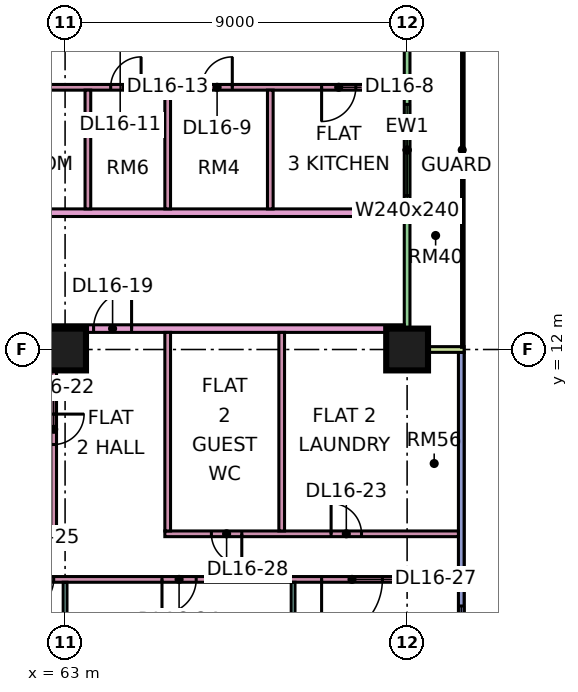
"""IFC4 building model, lengths in metres.
Left out: names, types, materials, properties, quantities, classifications, styles, units other than length and angle.
Written with IfcOpenShell. Run it as: python <this file> out.ifc"""

import sys

from ifc_helpers import new_model, si_unit, direction, frame, frame_2d, origin, origin_2d, place, context, subcontext, project, spatial, rectangle, extrude, element, fill, save


model = new_model("IFC4")
c1 = context("Model", 3, precision=1e-05, world=origin(), true_north=direction((0.0, 1.0)))
c2 = subcontext(c1, "Body", "Model", "MODEL_VIEW")
j1 = project(units=[si_unit("LENGTHUNIT", "METRE"), si_unit("PLANEANGLEUNIT", "RADIAN")], contexts=[c1])
p1 = place(None, origin())
s1 = spatial("IfcSite", under=j1, at=p1, CompositionType="ELEMENT")
p2 = place(p1, origin())
s2 = spatial("IfcBuilding", under=s1, at=p2, CompositionType="ELEMENT")
p3 = place(p2, frame((0.0, 0.0, 75.15)))
s3 = spatial("IfcBuildingStorey", under=s2, at=p3, CompositionType="ELEMENT", Elevation=75.15)
for number, where, z_axis, x_axis in (
    (1, (63.0, 12.0, 0.0), (0.0, 0.0, 1.0), (1.0, 0.0, 0.0)),
    (2, (72.0, 12.0, 0.0), (0.0, 0.0, 1.0), (1.0, 0.0, 0.0)),
):
    element("IfcColumn", number, at=place(p3, frame(where, z_axis=z_axis, x_axis=x_axis)), inside=s3, PredefinedType="COLUMN", context=c2, shape_type="SweptSolid", body=[
        extrude(rectangle(XDim=1.1, YDim=1.1, at=origin_2d()), origin(), (0.0, 0.0, 1.0), 3.75),
    ])
p4 = place(p3, frame((73.425, 1.5, 0.0), z_axis=(0.0, 0.0, 1.0), x_axis=(0.0, 1.0, 0.0)))
e3 = element("IfcWall", 3, at=p4, inside=s3, PredefinedType="SOLIDWALL", context=c2, shape_type="SweptSolid", body=[
    extrude(rectangle(XDim=10.425, YDim=0.15, at=frame_2d((5.212, 0.0))), origin(), (0.0, 0.0, 1.0), 3.35),
])
p5 = place(p4, frame((0.75, 0.0, 0.45)))
e4 = element("IfcOpeningElement", 4, at=p5, cuts=e3, PredefinedType="OPENING", context=c2, shape_type="SweptSolid", body=[
    extrude(rectangle(XDim=3.0, YDim=2.4, at=frame_2d((1.5, 1.2))), frame((0.0, 0.085, 0.0), z_axis=(0.0, -1.0, 0.0), x_axis=(1.0, 0.0, 0.0)), (0.0, 0.0, 1.0), 0.17),
])
p6 = place(p3, frame((72.0, 12.075, 0.0), z_axis=(0.0, 0.0, 1.0), x_axis=(0.0, 1.0, 0.0)))
e5 = element("IfcWall", 5, at=p6, inside=s3, PredefinedType="SOLIDWALL", context=c2, shape_type="SweptSolid", body=[
    extrude(rectangle(XDim=10.35, YDim=0.15, at=frame_2d((5.175, 0.0))), origin(), (0.0, 0.0, 1.0), 3.35),
])
p7 = place(p6, frame((3.975, 0.0, 0.45)))
e6 = element("IfcOpeningElement", 6, at=p7, cuts=e5, PredefinedType="OPENING", context=c2, shape_type="SweptSolid", body=[
    extrude(rectangle(XDim=2.4, YDim=2.4, at=frame_2d((1.2, 1.2))), frame((0.0, 0.085, 0.0), z_axis=(0.0, -1.0, 0.0), x_axis=(1.0, 0.0, 0.0)), (0.0, 0.0, 1.0), 0.17),
])
p8 = place(p6, frame((8.587, 0.0, 0.45)))
e7 = element("IfcOpeningElement", 7, at=p8, cuts=e5, PredefinedType="OPENING", context=c2, shape_type="SweptSolid", body=[
    extrude(rectangle(XDim=1.2, YDim=2.4, at=frame_2d((0.6, 1.2))), frame((0.0, 0.085, 0.0), z_axis=(0.0, -1.0, 0.0), x_axis=(1.0, 0.0, 0.0)), (0.0, 0.0, 1.0), 0.17),
])
p9 = place(p3, frame((73.5, 12.0, 0.0), z_axis=(0.0, 0.0, 1.0), x_axis=(-1.0, 0.0, 0.0)))
e8 = element("IfcWall", 8, at=p9, inside=s3, PredefinedType="SOLIDWALL", context=c2, shape_type="SweptSolid", body=[
    extrude(rectangle(XDim=1.5, YDim=0.15, at=frame_2d((0.75, 0.0))), origin(), (0.0, 0.0, 1.0), 3.35),
])
p10 = place(p3, frame((40.65, 12.55, 0.0), z_axis=(0.0, 0.0, 1.0), x_axis=(1.0, 0.0, 0.0)))
e9 = element("IfcWall", 9, at=p10, inside=s3, PredefinedType="PARTITIONING", context=c2, shape_type="SweptSolid", body=[
    extrude(rectangle(XDim=31.276, YDim=0.2, at=frame_2d((15.638, 0.0))), origin(), (0.0, 0.0, 1.0), 3.35),
])
p11 = place(p10, frame((23.1, 0.0, 0.0)))
e10 = element("IfcOpeningElement", 10, at=p11, cuts=e9, PredefinedType="OPENING", context=c2, shape_type="SweptSolid", body=[
    extrude(rectangle(XDim=1.0, YDim=2.1, at=frame_2d((0.5, 1.05))), frame((0.0, 0.11, 0.0), z_axis=(0.0, -1.0, 0.0), x_axis=(1.0, 0.0, 0.0)), (0.0, 0.0, 1.0), 0.22),
])
p12 = place(p10, frame((1.05, 0.0, 0.0)))
e11 = element("IfcOpeningElement", 11, at=p12, cuts=e9, PredefinedType="OPENING", context=c2, shape_type="SweptSolid", body=[
    extrude(rectangle(XDim=1.0, YDim=2.1, at=frame_2d((0.5, 1.05))), frame((0.0, 0.11, 0.0), z_axis=(0.0, -1.0, 0.0), x_axis=(1.0, 0.0, 0.0)), (0.0, 0.0, 1.0), 0.22),
])
p13 = place(p3, frame((48.1, 5.95, 0.0), z_axis=(0.0, 0.0, 1.0), x_axis=(1.0, 0.0, 0.0)))
e12 = element("IfcWall", 12, at=p13, inside=s3, PredefinedType="PARTITIONING", context=c2, shape_type="SweptSolid", body=[
    extrude(rectangle(XDim=25.25, YDim=0.15, at=frame_2d((12.625, 0.0))), origin(), (0.0, 0.0, 1.0), 3.35),
])
p14 = place(p13, frame((0.95, 0.0, 0.0)))
e13 = element("IfcOpeningElement", 13, at=p14, cuts=e12, PredefinedType="OPENING", context=c2, shape_type="SweptSolid", body=[
    extrude(rectangle(XDim=0.9, YDim=2.1, at=frame_2d((0.45, 1.05))), frame((0.0, 0.085, 0.0), z_axis=(0.0, -1.0, 0.0), x_axis=(1.0, 0.0, 0.0)), (0.0, 0.0, 1.0), 0.17),
])
p15 = place(p13, frame((3.95, 0.0, 0.0)))
e14 = element("IfcOpeningElement", 14, at=p15, cuts=e12, PredefinedType="OPENING", context=c2, shape_type="SweptSolid", body=[
    extrude(rectangle(XDim=0.9, YDim=2.1, at=frame_2d((0.45, 1.05))), frame((0.0, 0.085, 0.0), z_axis=(0.0, -1.0, 0.0), x_axis=(1.0, 0.0, 0.0)), (0.0, 0.0, 1.0), 0.17),
])
p16 = place(p13, frame((6.95, 0.0, 0.0)))
e15 = element("IfcOpeningElement", 15, at=p16, cuts=e12, PredefinedType="OPENING", context=c2, shape_type="SweptSolid", body=[
    extrude(rectangle(XDim=0.9, YDim=2.1, at=frame_2d((0.45, 1.05))), frame((0.0, 0.085, 0.0), z_axis=(0.0, -1.0, 0.0), x_axis=(1.0, 0.0, 0.0)), (0.0, 0.0, 1.0), 0.17),
])
p17 = place(p13, frame((9.95, 0.0, 0.0)))
e16 = element("IfcOpeningElement", 16, at=p17, cuts=e12, PredefinedType="OPENING", context=c2, shape_type="SweptSolid", body=[
    extrude(rectangle(XDim=0.9, YDim=2.1, at=frame_2d((0.45, 1.05))), frame((0.0, 0.085, 0.0), z_axis=(0.0, -1.0, 0.0), x_axis=(1.0, 0.0, 0.0)), (0.0, 0.0, 1.0), 0.17),
])
p18 = place(p13, frame((17.45, 0.0, 0.0)))
e17 = element("IfcOpeningElement", 17, at=p18, cuts=e12, PredefinedType="OPENING", context=c2, shape_type="SweptSolid", body=[
    extrude(rectangle(XDim=0.9, YDim=2.1, at=frame_2d((0.45, 1.05))), frame((0.0, 0.085, 0.0), z_axis=(0.0, -1.0, 0.0), x_axis=(1.0, 0.0, 0.0)), (0.0, 0.0, 1.0), 0.17),
])
p19 = place(p13, frame((13.8, 0.0, 0.0)))
e18 = element("IfcOpeningElement", 18, at=p19, cuts=e12, PredefinedType="OPENING", context=c2, shape_type="SweptSolid", body=[
    extrude(rectangle(XDim=0.8, YDim=2.1, at=frame_2d((0.4, 1.05))), frame((0.0, 0.085, 0.0), z_axis=(0.0, -1.0, 0.0), x_axis=(1.0, 0.0, 0.0)), (0.0, 0.0, 1.0), 0.17),
])
p20 = place(p13, frame((21.65, 0.0, 0.0)))
e19 = element("IfcOpeningElement", 19, at=p20, cuts=e12, PredefinedType="OPENING", context=c2, shape_type="SweptSolid", body=[
    extrude(rectangle(XDim=1.6, YDim=2.1, at=frame_2d((0.8, 1.05))), frame((0.0, 0.085, 0.0), z_axis=(0.0, -1.0, 0.0), x_axis=(1.0, 0.0, 0.0)), (0.0, 0.0, 1.0), 0.17),
])
p21 = place(p3, frame((48.1, 7.15, 0.0), z_axis=(0.0, 0.0, 1.0), x_axis=(1.0, 0.0, 0.0)))
e20 = element("IfcWall", 20, at=p21, inside=s3, PredefinedType="PARTITIONING", context=c2, shape_type="SweptSolid", body=[
    extrude(rectangle(XDim=14.675, YDim=0.15, at=frame_2d((7.337, 0.0))), origin(), (0.0, 0.0, 1.0), 3.35),
])
p22 = place(p21, frame((3.75, 0.0, 0.0)))
e21 = element("IfcOpeningElement", 21, at=p22, cuts=e20, PredefinedType="OPENING", context=c2, shape_type="SweptSolid", body=[
    extrude(rectangle(XDim=0.8, YDim=2.1, at=frame_2d((0.4, 1.05))), frame((0.0, 0.085, 0.0), z_axis=(0.0, -1.0, 0.0), x_axis=(1.0, 0.0, 0.0)), (0.0, 0.0, 1.0), 0.17),
])
p23 = place(p21, frame((7.85, 0.0, 0.0)))
e22 = element("IfcOpeningElement", 22, at=p23, cuts=e20, PredefinedType="OPENING", context=c2, shape_type="SweptSolid", body=[
    extrude(rectangle(XDim=0.9, YDim=2.1, at=frame_2d((0.45, 1.05))), frame((0.0, 0.085, 0.0), z_axis=(0.0, -1.0, 0.0), x_axis=(1.0, 0.0, 0.0)), (0.0, 0.0, 1.0), 0.17),
])
p24 = place(p21, frame((1.05, 0.0, 0.0)))
e23 = element("IfcOpeningElement", 23, at=p24, cuts=e20, PredefinedType="OPENING", context=c2, shape_type="SweptSolid", body=[
    extrude(rectangle(XDim=0.8, YDim=2.1, at=frame_2d((0.4, 1.05))), frame((0.0, 0.085, 0.0), z_axis=(0.0, -1.0, 0.0), x_axis=(1.0, 0.0, 0.0)), (0.0, 0.0, 1.0), 0.17),
])
p25 = place(p3, frame((51.225, 15.6, 0.0), z_axis=(0.0, 0.0, 1.0), x_axis=(1.0, 0.0, 0.0)))
e24 = element("IfcWall", 24, at=p25, inside=s3, PredefinedType="PARTITIONING", context=c2, shape_type="SweptSolid", body=[
    extrude(rectangle(XDim=20.701, YDim=0.2, at=frame_2d((10.351, 0.0))), origin(), (0.0, 0.0, 1.0), 3.35),
])
p26 = place(p25, frame((3.725, 0.0, 0.0)))
e25 = element("IfcOpeningElement", 25, at=p26, cuts=e24, PredefinedType="OPENING", context=c2, shape_type="SweptSolid", body=[
    extrude(rectangle(XDim=1.0, YDim=2.1, at=frame_2d((0.5, 1.05))), frame((0.0, 0.11, 0.0), z_axis=(0.0, -1.0, 0.0), x_axis=(1.0, 0.0, 0.0)), (0.0, 0.0, 1.0), 0.22),
])
p27 = place(p25, frame((0.875, 0.0, 0.0)))
e26 = element("IfcOpeningElement", 26, at=p27, cuts=e24, PredefinedType="OPENING", context=c2, shape_type="SweptSolid", body=[
    extrude(rectangle(XDim=1.0, YDim=2.1, at=frame_2d((0.5, 1.05))), frame((0.0, 0.11, 0.0), z_axis=(0.0, -1.0, 0.0), x_axis=(1.0, 0.0, 0.0)), (0.0, 0.0, 1.0), 0.22),
])
p28 = place(p3, frame((56.925, 18.9, 0.0), z_axis=(0.0, 0.0, 1.0), x_axis=(1.0, 0.0, 0.0)))
e27 = element("IfcWall", 27, at=p28, inside=s3, PredefinedType="PARTITIONING", context=c2, shape_type="SweptSolid", body=[
    extrude(rectangle(XDim=15.001, YDim=0.15, at=frame_2d((7.5, 0.0))), origin(), (0.0, 0.0, 1.0), 3.35),
])
p29 = place(p28, frame((4.125, 0.0, 0.0)))
e28 = element("IfcOpeningElement", 28, at=p29, cuts=e27, PredefinedType="OPENING", context=c2, shape_type="SweptSolid", body=[
    extrude(rectangle(XDim=0.8, YDim=2.1, at=frame_2d((0.4, 1.05))), frame((0.0, 0.085, 0.0), z_axis=(0.0, -1.0, 0.0), x_axis=(1.0, 0.0, 0.0)), (0.0, 0.0, 1.0), 0.17),
])
p30 = place(p28, frame((12.825, 0.0, 0.0)))
e29 = element("IfcOpeningElement", 29, at=p30, cuts=e27, PredefinedType="OPENING", context=c2, shape_type="SweptSolid", body=[
    extrude(rectangle(XDim=0.9, YDim=2.1, at=frame_2d((0.45, 1.05))), frame((0.0, 0.085, 0.0), z_axis=(0.0, -1.0, 0.0), x_axis=(1.0, 0.0, 0.0)), (0.0, 0.0, 1.0), 0.17),
])
p31 = place(p28, frame((9.675, 0.0, 0.0)))
e30 = element("IfcOpeningElement", 30, at=p31, cuts=e27, PredefinedType="OPENING", context=c2, shape_type="SweptSolid", body=[
    extrude(rectangle(XDim=0.8, YDim=2.1, at=frame_2d((0.4, 1.05))), frame((0.0, 0.085, 0.0), z_axis=(0.0, -1.0, 0.0), x_axis=(1.0, 0.0, 0.0)), (0.0, 0.0, 1.0), 0.17),
])
p32 = place(p28, frame((0.825, 0.0, 0.0)))
e31 = element("IfcOpeningElement", 31, at=p32, cuts=e27, PredefinedType="OPENING", context=c2, shape_type="SweptSolid", body=[
    extrude(rectangle(XDim=0.8, YDim=2.1, at=frame_2d((0.4, 1.05))), frame((0.0, 0.085, 0.0), z_axis=(0.0, -1.0, 0.0), x_axis=(1.0, 0.0, 0.0)), (0.0, 0.0, 1.0), 0.17),
])
p33 = place(p28, frame((7.275, 0.0, 0.0)))
e32 = element("IfcOpeningElement", 32, at=p33, cuts=e27, PredefinedType="OPENING", context=c2, shape_type="SweptSolid", body=[
    extrude(rectangle(XDim=0.8, YDim=2.1, at=frame_2d((0.4, 1.05))), frame((0.0, 0.085, 0.0), z_axis=(0.0, -1.0, 0.0), x_axis=(1.0, 0.0, 0.0)), (0.0, 0.0, 1.0), 0.17),
])
p34 = place(p3, frame((62.7, 7.225, 0.0), z_axis=(0.0, 0.0, 1.0), x_axis=(0.0, 1.0, 0.0)))
e33 = element("IfcWall", 33, at=p34, inside=s3, PredefinedType="PARTITIONING", context=c2, shape_type="SweptSolid", body=[
    extrude(rectangle(XDim=5.225, YDim=0.15, at=frame_2d((2.612, 0.0))), origin(), (0.0, 0.0, 1.0), 3.35),
])
p35 = place(p34, frame((2.275, 0.0, 0.0)))
e34 = element("IfcOpeningElement", 34, at=p35, cuts=e33, PredefinedType="OPENING", context=c2, shape_type="SweptSolid", body=[
    extrude(rectangle(XDim=0.8, YDim=2.1, at=frame_2d((0.4, 1.05))), frame((0.0, 0.085, 0.0), z_axis=(0.0, -1.0, 0.0), x_axis=(1.0, 0.0, 0.0)), (0.0, 0.0, 1.0), 0.17),
])
p36 = place(p3, frame((63.0, 0.074, 0.0), z_axis=(0.0, 0.0, 1.0), x_axis=(0.0, 1.0, 0.0)))
e35 = element("IfcWall", 35, at=p36, inside=s3, PredefinedType="PARTITIONING", context=c2, shape_type="SweptSolid", body=[
    extrude(rectangle(XDim=5.801, YDim=0.1, at=frame_2d((2.9, 0.0))), origin(), (0.0, 0.0, 1.0), 3.35),
])
p37 = place(p3, frame((63.6, 15.7, 0.0), z_axis=(0.0, 0.0, 1.0), x_axis=(0.0, 1.0, 0.0)))
e36 = element("IfcWall", 36, at=p37, inside=s3, PredefinedType="PARTITIONING", context=c2, shape_type="SweptSolid", body=[
    extrude(rectangle(XDim=3.125, YDim=0.15, at=frame_2d((1.562, 0.0))), origin(), (0.0, 0.0, 1.0), 3.35),
])
p38 = place(p3, frame((65.625, 7.15, 0.0), z_axis=(0.0, 0.0, 1.0), x_axis=(1.0, 0.0, 0.0)))
e37 = element("IfcWall", 37, at=p38, inside=s3, PredefinedType="PARTITIONING", context=c2, shape_type="SweptSolid", body=[
    extrude(rectangle(XDim=7.725, YDim=0.15, at=frame_2d((3.863, 0.0))), origin(), (0.0, 0.0, 1.0), 3.35),
])
p39 = place(p38, frame((4.375, 0.0, 0.0)))
e38 = element("IfcOpeningElement", 38, at=p39, cuts=e37, PredefinedType="OPENING", context=c2, shape_type="SweptSolid", body=[
    extrude(rectangle(XDim=0.8, YDim=2.1, at=frame_2d((0.4, 1.05))), frame((0.0, 0.085, 0.0), z_axis=(0.0, -1.0, 0.0), x_axis=(1.0, 0.0, 0.0)), (0.0, 0.0, 1.0), 0.17),
])
p40 = place(p38, frame((1.225, 0.0, 0.0)))
e39 = element("IfcOpeningElement", 39, at=p40, cuts=e37, PredefinedType="OPENING", context=c2, shape_type="SweptSolid", body=[
    extrude(rectangle(XDim=0.8, YDim=2.1, at=frame_2d((0.4, 1.05))), frame((0.0, 0.085, 0.0), z_axis=(0.0, -1.0, 0.0), x_axis=(1.0, 0.0, 0.0)), (0.0, 0.0, 1.0), 0.17),
])
p41 = place(p3, frame((65.7, 7.225, 0.0), z_axis=(0.0, 0.0, 1.0), x_axis=(0.0, 1.0, 0.0)))
e40 = element("IfcWall", 40, at=p41, inside=s3, PredefinedType="PARTITIONING", context=c2, shape_type="SweptSolid", body=[
    extrude(rectangle(XDim=5.225, YDim=0.15, at=frame_2d((2.612, 0.0))), origin(), (0.0, 0.0, 1.0), 3.35),
])
for number, where, z_axis, x_axis in (
    (41, (65.7, 15.7, 0.0), (0.0, 0.0, 1.0), (0.0, 1.0, 0.0)),
    (42, (68.4, 15.7, 0.0), (0.0, 0.0, 1.0), (0.0, 1.0, 0.0)),
):
    element("IfcWall", number, at=place(p3, frame(where, z_axis=z_axis, x_axis=x_axis)), inside=s3, PredefinedType="PARTITIONING", context=c2, shape_type="SweptSolid", body=[
        extrude(rectangle(XDim=3.125, YDim=0.15, at=frame_2d((1.562, 0.0))), origin(), (0.0, 0.0, 1.0), 3.35),
    ])
p42 = place(p3, frame((68.7, 7.225, 0.0), z_axis=(0.0, 0.0, 1.0), x_axis=(0.0, 1.0, 0.0)))
e43 = element("IfcWall", 43, at=p42, inside=s3, PredefinedType="PARTITIONING", context=c2, shape_type="SweptSolid", body=[
    extrude(rectangle(XDim=5.225, YDim=0.15, at=frame_2d((2.612, 0.0))), origin(), (0.0, 0.0, 1.0), 3.35),
])
p43 = place(p3, frame((69.0, 0.074, 0.0), z_axis=(0.0, 0.0, 1.0), x_axis=(0.0, 1.0, 0.0)))
e44 = element("IfcWall", 44, at=p43, inside=s3, PredefinedType="PARTITIONING", context=c2, shape_type="SweptSolid", body=[
    extrude(rectangle(XDim=5.801, YDim=0.1, at=frame_2d((2.9, 0.0))), origin(), (0.0, 0.0, 1.0), 3.35),
])
p44 = place(p5, origin())
e45 = element("IfcWindow", 45, at=p44, inside=s3, PartitioningType="SINGLE_PANEL", PredefinedType="WINDOW", context=c2, shape_type="SweptSolid", body=[
    extrude(rectangle(XDim=3.0, YDim=2.4, at=frame_2d((1.5, 1.2))), frame((0.0, 0.03, 0.0), z_axis=(0.0, -1.0, 0.0), x_axis=(1.0, 0.0, 0.0)), (0.0, 0.0, 1.0), 0.06),
])
fill(e4, e45)
p45 = place(p7, origin())
e46 = element("IfcWindow", 46, at=p45, inside=s3, PartitioningType="SINGLE_PANEL", PredefinedType="WINDOW", context=c2, shape_type="SweptSolid", body=[
    extrude(rectangle(XDim=2.4, YDim=2.4, at=frame_2d((1.2, 1.2))), frame((0.0, 0.03, 0.0), z_axis=(0.0, -1.0, 0.0), x_axis=(1.0, 0.0, 0.0)), (0.0, 0.0, 1.0), 0.06),
])
fill(e6, e46)
p46 = place(p30, frame((0.9, 0.0, 0.0), z_axis=(0.0, 0.0, 1.0), x_axis=(-1.0, 0.0, 0.0)))
e47 = element("IfcDoor", 47, at=p46, inside=s3, OperationType="SINGLE_SWING_LEFT", PredefinedType="DOOR", context=c2, shape_type="SweptSolid", body=[
    extrude(rectangle(XDim=0.9, YDim=2.1, at=frame_2d((0.45, 1.05))), frame((0.0, 0.025, 0.0), z_axis=(0.0, -1.0, 0.0), x_axis=(1.0, 0.0, 0.0)), (0.0, 0.0, 1.0), 0.05),
])
fill(e29, e47)
p47 = place(p31, frame((0.8, 0.0, 0.0), z_axis=(0.0, 0.0, 1.0), x_axis=(-1.0, 0.0, 0.0)))
e48 = element("IfcDoor", 48, at=p47, inside=s3, OperationType="SINGLE_SWING_RIGHT", PredefinedType="DOOR", context=c2, shape_type="SweptSolid", body=[
    extrude(rectangle(XDim=0.8, YDim=2.1, at=frame_2d((0.4, 1.05))), frame((0.0, 0.025, 0.0), z_axis=(0.0, -1.0, 0.0), x_axis=(1.0, 0.0, 0.0)), (0.0, 0.0, 1.0), 0.05),
])
fill(e30, e48)
p48 = place(p33, frame((0.8, 0.0, 0.0), z_axis=(0.0, 0.0, 1.0), x_axis=(-1.0, 0.0, 0.0)))
e49 = element("IfcDoor", 49, at=p48, inside=s3, OperationType="SINGLE_SWING_RIGHT", PredefinedType="DOOR", context=c2, shape_type="SweptSolid", body=[
    extrude(rectangle(XDim=0.8, YDim=2.1, at=frame_2d((0.4, 1.05))), frame((0.0, 0.025, 0.0), z_axis=(0.0, -1.0, 0.0), x_axis=(1.0, 0.0, 0.0)), (0.0, 0.0, 1.0), 0.05),
])
fill(e32, e49)
p49 = place(p11, frame((1.0, 0.0, 0.0), z_axis=(0.0, 0.0, 1.0), x_axis=(-1.0, 0.0, 0.0)))
e50 = element("IfcDoor", 50, at=p49, inside=s3, OperationType="SINGLE_SWING_RIGHT", PredefinedType="DOOR", context=c2, shape_type="SweptSolid", body=[
    extrude(rectangle(XDim=1.0, YDim=2.1, at=frame_2d((0.5, 1.05))), frame((0.0, 0.025, 0.0), z_axis=(0.0, -1.0, 0.0), x_axis=(1.0, 0.0, 0.0)), (0.0, 0.0, 1.0), 0.05),
])
fill(e10, e50)
p50 = place(p35, origin())
e51 = element("IfcDoor", 51, at=p50, inside=s3, OperationType="SINGLE_SWING_RIGHT", PredefinedType="DOOR", context=c2, shape_type="SweptSolid", body=[
    extrude(rectangle(XDim=0.8, YDim=2.1, at=frame_2d((0.4, 1.05))), frame((0.0, 0.025, 0.0), z_axis=(0.0, -1.0, 0.0), x_axis=(1.0, 0.0, 0.0)), (0.0, 0.0, 1.0), 0.05),
])
fill(e34, e51)
p51 = place(p39, origin())
e52 = element("IfcDoor", 52, at=p51, inside=s3, OperationType="SINGLE_SWING_LEFT", PredefinedType="DOOR", context=c2, shape_type="SweptSolid", body=[
    extrude(rectangle(XDim=0.8, YDim=2.1, at=frame_2d((0.4, 1.05))), frame((0.0, 0.025, 0.0), z_axis=(0.0, -1.0, 0.0), x_axis=(1.0, 0.0, 0.0)), (0.0, 0.0, 1.0), 0.05),
])
fill(e38, e52)
p52 = place(p18, frame((0.9, 0.0, 0.0), z_axis=(0.0, 0.0, 1.0), x_axis=(-1.0, 0.0, 0.0)))
e53 = element("IfcDoor", 53, at=p52, inside=s3, OperationType="SINGLE_SWING_LEFT", PredefinedType="DOOR", context=c2, shape_type="SweptSolid", body=[
    extrude(rectangle(XDim=0.9, YDim=2.1, at=frame_2d((0.45, 1.05))), frame((0.0, 0.025, 0.0), z_axis=(0.0, -1.0, 0.0), x_axis=(1.0, 0.0, 0.0)), (0.0, 0.0, 1.0), 0.05),
])
fill(e17, e53)
p53 = place(p19, frame((0.8, 0.0, 0.0), z_axis=(0.0, 0.0, 1.0), x_axis=(-1.0, 0.0, 0.0)))
e54 = element("IfcDoor", 54, at=p53, inside=s3, OperationType="SINGLE_SWING_LEFT", PredefinedType="DOOR", context=c2, shape_type="SweptSolid", body=[
    extrude(rectangle(XDim=0.8, YDim=2.1, at=frame_2d((0.4, 1.05))), frame((0.0, 0.025, 0.0), z_axis=(0.0, -1.0, 0.0), x_axis=(1.0, 0.0, 0.0)), (0.0, 0.0, 1.0), 0.05),
])
fill(e18, e54)
p54 = place(p20, frame((1.6, 0.0, 0.0), z_axis=(0.0, 0.0, 1.0), x_axis=(-1.0, 0.0, 0.0)))
e55 = element("IfcDoor", 55, at=p54, inside=s3, OperationType="DOUBLE_DOOR_SINGLE_SWING", PredefinedType="DOOR", context=c2, shape_type="SweptSolid", body=[
    extrude(rectangle(XDim=1.6, YDim=2.1, at=frame_2d((0.8, 1.05))), frame((0.0, 0.025, 0.0), z_axis=(0.0, -1.0, 0.0), x_axis=(1.0, 0.0, 0.0)), (0.0, 0.0, 1.0), 0.05),
])
fill(e19, e55)
p55 = place(p40, origin())
e56 = element("IfcDoor", 56, at=p55, inside=s3, OperationType="SINGLE_SWING_RIGHT", PredefinedType="DOOR", context=c2, shape_type="SweptSolid", body=[
    extrude(rectangle(XDim=0.8, YDim=2.1, at=frame_2d((0.4, 1.05))), frame((0.0, 0.025, 0.0), z_axis=(0.0, -1.0, 0.0), x_axis=(1.0, 0.0, 0.0)), (0.0, 0.0, 1.0), 0.05),
])
fill(e39, e56)
save(model, sys.argv[1])
